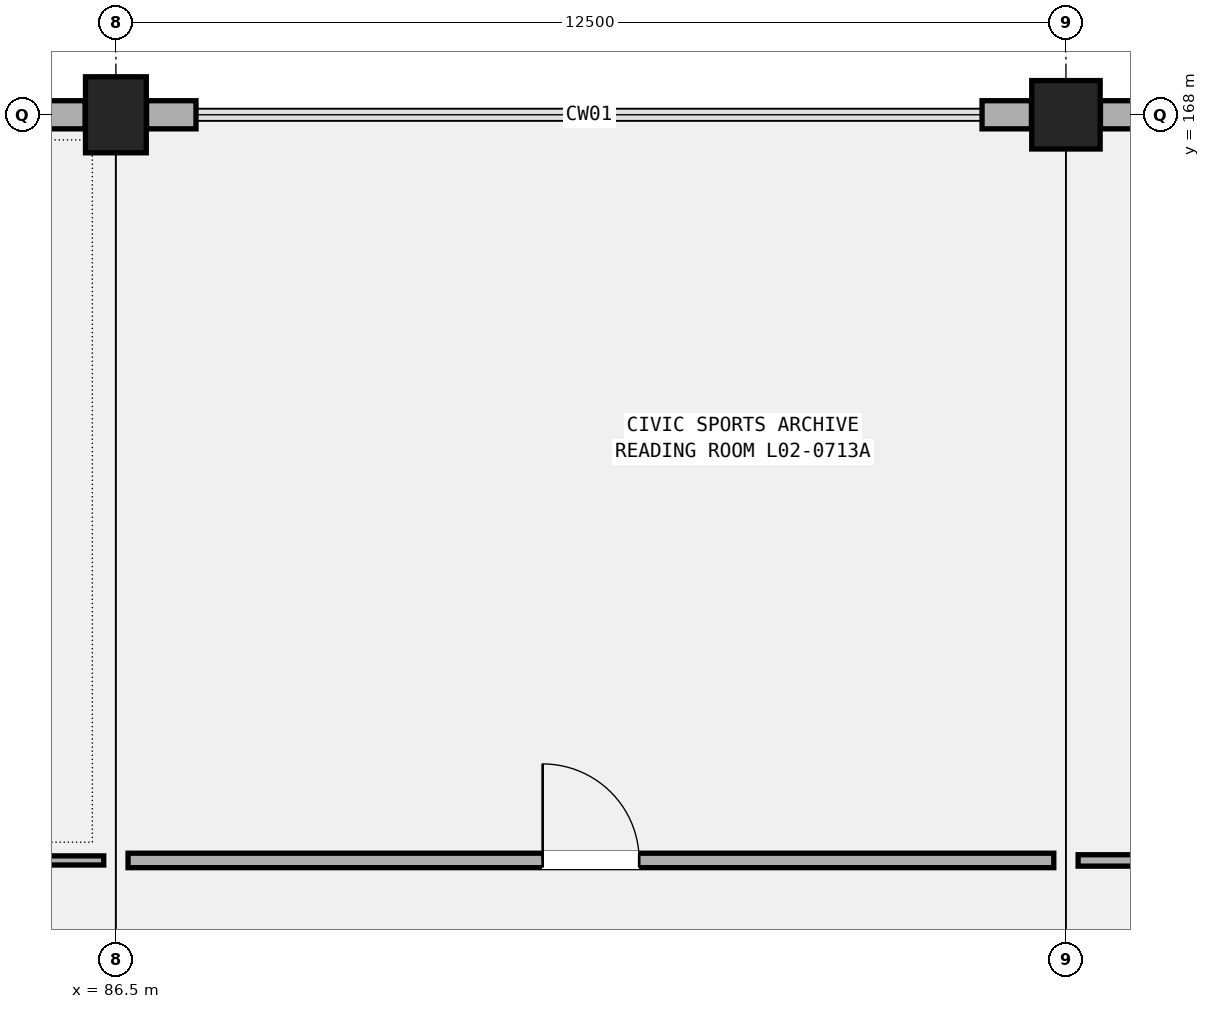
"""IFC4 building model, lengths in metres.
Left out: names, types, materials, properties, quantities, classifications, styles, units other than length and angle.
Written with IfcOpenShell. Run it as: python <this file> out.ifc"""

import sys

from ifc_helpers import new_model, si_unit, direction, frame, frame_2d, origin, origin_2d, place, context, subcontext, project, spatial, rectangle, extrude, element, fill, save


model = new_model("IFC4")
c1 = context("Model", 3, precision=1e-05, world=origin(), true_north=direction((0.0, 1.0)))
c2 = subcontext(c1, "Body", "Model", "MODEL_VIEW")
j1 = project(units=[si_unit("LENGTHUNIT", "METRE"), si_unit("PLANEANGLEUNIT", "RADIAN")], contexts=[c1])
p1 = place(None, origin())
s1 = spatial("IfcSite", under=j1, at=p1, CompositionType="ELEMENT")
p2 = place(p1, origin())
s2 = spatial("IfcBuilding", under=s1, at=p2, CompositionType="ELEMENT")
p3 = place(p2, frame((0.0, 0.0, 10.2)))
s3 = spatial("IfcBuildingStorey", under=s2, at=p3, CompositionType="ELEMENT", Elevation=10.2)
p4 = place(p3, frame((86.5, 168.0, 0.0), z_axis=(0.0, 0.0, 1.0), x_axis=(1.0, 0.0, 0.0)))
e1 = element("IfcColumn", 1, at=p4, inside=s3, PredefinedType="COLUMN", context=c2, shape_type="SweptSolid", body=[
    extrude(rectangle(XDim=0.8, YDim=1.0, at=origin_2d()), origin(), (0.0, 0.0, 1.0), 5.1),
])
p5 = place(p3, frame((99.0, 168.0, 0.0), z_axis=(0.0, 0.0, 1.0), x_axis=(1.0, 0.0, 0.0)))
e2 = element("IfcColumn", 2, at=p5, inside=s3, PredefinedType="COLUMN", context=c2, shape_type="SweptSolid", body=[
    extrude(rectangle(XDim=0.9, YDim=0.9, at=origin_2d()), origin(), (0.0, 0.0, 1.0), 5.1),
])
p6 = place(p3, frame((85.446, 168.0, 0.0), z_axis=(0.0, 0.0, 1.0), x_axis=(1.0, 0.0, 0.0)))
e3 = element("IfcWall", 3, at=p6, inside=s3, PredefinedType="SOLIDWALL", context=c2, shape_type="SweptSolid", body=[
    extrude(rectangle(XDim=0.65, YDim=0.37, at=frame_2d((0.325, 0.0))), origin(), (0.0, 0.0, 1.0), 4.22),
])
for number, where, z_axis, x_axis in (
    (4, (86.904, 168.0, 0.0), (0.0, 0.0, 1.0), (1.0, 0.0, 0.0)),
    (5, (97.896, 168.0, 0.0), (0.0, 0.0, 1.0), (1.0, 0.0, 0.0)),
):
    element("IfcWall", number, at=place(p3, frame(where, z_axis=z_axis, x_axis=x_axis)), inside=s3, PredefinedType="SOLIDWALL", context=c2, shape_type="SweptSolid", body=[
        extrude(rectangle(XDim=0.65, YDim=0.37, at=frame_2d((0.325, 0.0))), origin(), (0.0, 0.0, 1.0), 4.02),
    ])
p7 = place(p3, frame((99.454, 168.0, 0.0), z_axis=(0.0, 0.0, 1.0), x_axis=(1.0, 0.0, 0.0)))
e6 = element("IfcWall", 6, at=p7, inside=s3, PredefinedType="SOLIDWALL", context=c2, shape_type="SweptSolid", body=[
    extrude(rectangle(XDim=0.65, YDim=0.37, at=frame_2d((0.325, 0.0))), origin(), (0.0, 0.0, 1.0), 4.12),
])
p8 = place(p3, frame((74.16, 158.19, 0.0), z_axis=(0.0, 0.0, 1.0), x_axis=(1.0, 0.0, 0.0)))
e7 = element("IfcWall", 7, at=p8, inside=s3, PredefinedType="PARTITIONING", context=c2, shape_type="SweptSolid", body=[
    extrude(rectangle(XDim=12.18, YDim=0.12, at=frame_2d((6.09, 0.0))), origin(), (0.0, 0.0, 1.0), 4.22),
])
p9 = place(p8, frame((5.485, 0.0, 0.0)))
e8 = element("IfcOpeningElement", 8, at=p9, cuts=e7, PredefinedType="OPENING", context=c2, shape_type="SweptSolid", body=[
    extrude(rectangle(XDim=1.21, YDim=2.18, at=frame_2d((0.605, 1.09))), frame((0.0, 0.07, 0.0), z_axis=(0.0, -1.0, 0.0), x_axis=(1.0, 0.0, 0.0)), (0.0, 0.0, 1.0), 0.14),
])
p10 = place(p3, frame((86.66, 158.19, 0.0), z_axis=(0.0, 0.0, 1.0), x_axis=(1.0, 0.0, 0.0)))
e9 = element("IfcWall", 9, at=p10, inside=s3, PredefinedType="PARTITIONING", context=c2, shape_type="SweptSolid", body=[
    extrude(rectangle(XDim=12.18, YDim=0.19, at=frame_2d((6.09, 0.0))), origin(), (0.0, 0.0, 1.0), 4.22),
])
p11 = place(p10, frame((5.455, 0.0, 0.0)))
e10 = element("IfcOpeningElement", 10, at=p11, cuts=e9, PredefinedType="OPENING", context=c2, shape_type="SweptSolid", body=[
    extrude(rectangle(XDim=1.27, YDim=2.2, at=frame_2d((0.635, 1.1))), frame((0.0, 0.105, 0.0), z_axis=(0.0, -1.0, 0.0), x_axis=(1.0, 0.0, 0.0)), (0.0, 0.0, 1.0), 0.21),
])
p12 = place(p3, frame((99.16, 158.19, 0.0), z_axis=(0.0, 0.0, 1.0), x_axis=(1.0, 0.0, 0.0)))
e11 = element("IfcWall", 11, at=p12, inside=s3, PredefinedType="PARTITIONING", context=c2, shape_type="SweptSolid", body=[
    extrude(rectangle(XDim=12.68, YDim=0.15, at=frame_2d((6.34, 0.0))), origin(), (0.0, 0.0, 1.0), 4.22),
])
p13 = place(p12, frame((5.6, 0.0, 0.0)))
e12 = element("IfcOpeningElement", 12, at=p13, cuts=e11, PredefinedType="OPENING", context=c2, shape_type="SweptSolid", body=[
    extrude(rectangle(XDim=1.48, YDim=2.24, at=frame_2d((0.74, 1.12))), frame((0.0, 0.085, 0.0), z_axis=(0.0, -1.0, 0.0), x_axis=(1.0, 0.0, 0.0)), (0.0, 0.0, 1.0), 0.17),
])
p14 = place(p11, origin())
e13 = element("IfcDoor", 13, at=p14, inside=s3, OperationType="SINGLE_SWING_LEFT", PredefinedType="DOOR", context=c2, shape_type="SweptSolid", body=[
    extrude(rectangle(XDim=1.27, YDim=2.2, at=frame_2d((0.635, 1.1))), frame((0.0, 0.025, 0.0), z_axis=(0.0, -1.0, 0.0), x_axis=(1.0, 0.0, 0.0)), (0.0, 0.0, 1.0), 0.05),
])
fill(e10, e13)
save(model, sys.argv[1])
